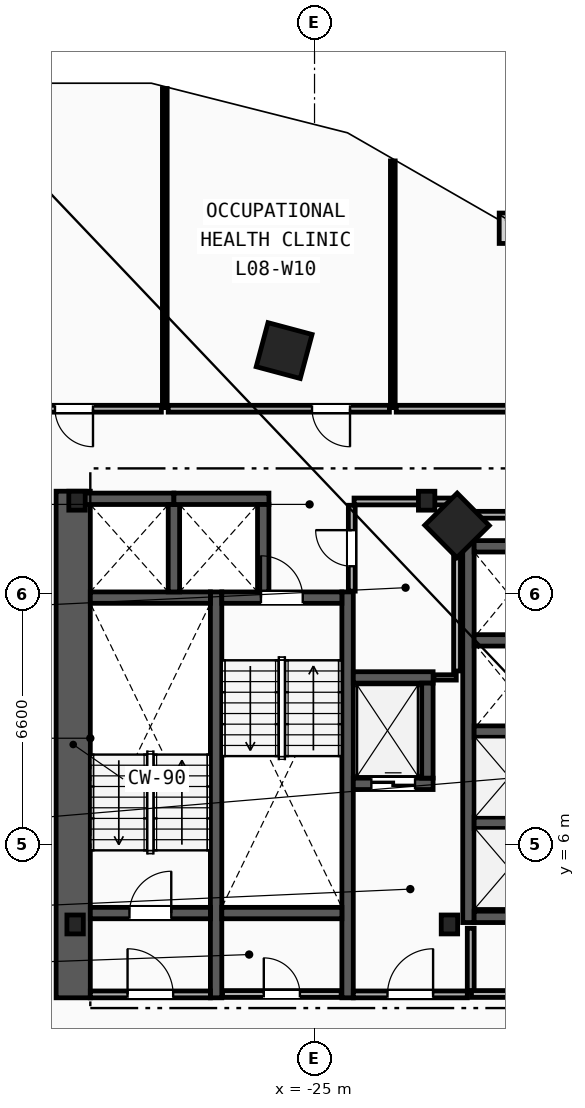
"""IFC4 building model, lengths in metres.
Left out: names, types, materials, properties, quantities, classifications, styles, units other than length and angle.
Written with IfcOpenShell. Run it as: python <this file> out.ifc"""

import sys

from ifc_helpers import new_model, si_unit, direction, frame, frame_2d, origin, origin_2d, place, context, subcontext, project, spatial, rectangle, i_section, extrude, element, fill, save


model = new_model("IFC4")
c1 = context("Model", 3, precision=1e-05, world=origin(), true_north=direction((0.0, 1.0)))
c2 = subcontext(c1, "Body", "Model", "MODEL_VIEW")
j1 = project(units=[si_unit("LENGTHUNIT", "METRE"), si_unit("PLANEANGLEUNIT", "RADIAN")], contexts=[c1])
p1 = place(None, origin())
s1 = spatial("IfcSite", under=j1, at=p1, CompositionType="ELEMENT")
p2 = place(p1, origin())
s2 = spatial("IfcBuilding", under=s1, at=p2, CompositionType="ELEMENT")
p3 = place(p2, frame((0.0, 0.0, 35.4)))
s3 = spatial("IfcBuildingStorey", under=s2, at=p3, CompositionType="ELEMENT", Elevation=35.4)
for number, where, z_axis, x_axis in (
    (1, (-31.3, 3.9, 0.0), (0.0, 0.0, 1.0), (1.0, 0.0, 0.0)),
    (2, (-21.45, 3.9, 0.0), (0.0, 0.0, 1.0), (1.0, 0.0, 0.0)),
    (3, (-22.05, 15.05, 0.0), (0.0, 0.0, 1.0), (1.0, 0.0, 0.0)),
    (4, (-31.25, 15.05, 0.0), (0.0, 0.0, 1.0), (1.0, 0.0, 0.0)),
):
    element("IfcColumn", number, at=place(p3, frame(where, z_axis=z_axis, x_axis=x_axis)), inside=s3, PredefinedType="COLUMN", context=c2, shape_type="SweptSolid", body=[
        extrude(i_section(OverallWidth=0.432, OverallDepth=0.498, WebThickness=0.056, FlangeThickness=0.089, FilletRadius=0.018, at=origin_2d()), origin(), (0.0, 0.0, 1.0), 3.8),
    ])
for number, where, z_axis, x_axis in (
    (5, (-21.25, 14.4, 0.0), (0.0, 0.0, 1.0), (-0.703, 0.711, 0.0)),
    (6, (-25.8, 19.0, 0.0), (0.0, 0.0, 1.0), (-0.966, 0.259, 0.0)),
):
    element("IfcColumn", number, at=place(p3, frame(where, z_axis=z_axis, x_axis=x_axis)), inside=s3, PredefinedType="COLUMN", context=c2, shape_type="SweptSolid", body=[
        extrude(rectangle(XDim=1.2, YDim=1.2, at=origin_2d()), origin(), (0.0, 0.0, 1.0), 3.8),
    ])
p4 = place(p3, frame((-31.35, 1.97, 0.0), z_axis=(0.0, 0.0, 1.0), x_axis=(0.0, 1.0, 0.0)))
e7 = element("IfcWall", 7, at=p4, inside=s3, PredefinedType="SHEAR", context=c2, shape_type="SweptSolid", body=[
    extrude(rectangle(XDim=13.33, YDim=0.9, at=frame_2d((6.665, 0.0))), origin(), (0.0, 0.0, 1.0), 3.5),
])
for number, where, z_axis, x_axis in (
    (8, (-27.59, 1.97, 0.0), (0.0, 0.0, 1.0), (0.0, 1.0, 0.0)),
    (9, (-24.13, 1.97, 0.0), (0.0, 0.0, 1.0), (0.0, 1.0, 0.0)),
):
    element("IfcWall", number, at=place(p3, frame(where, z_axis=z_axis, x_axis=x_axis)), inside=s3, PredefinedType="SHEAR", context=c2, shape_type="SweptSolid", body=[
        extrude(rectangle(XDim=10.68, YDim=0.3, at=frame_2d((5.34, 0.0))), origin(), (0.0, 0.0, 1.0), 3.5),
    ])
p5 = place(p3, frame((-30.9, 4.2, 0.0), z_axis=(0.0, 0.0, 1.0), x_axis=(1.0, 0.0, 0.0)))
e10 = element("IfcWall", 10, at=p5, inside=s3, PredefinedType="SHEAR", context=c2, shape_type="SweptSolid", body=[
    extrude(rectangle(XDim=3.16, YDim=0.3, at=frame_2d((1.58, 0.0))), origin(), (0.0, 0.0, 1.0), 3.5),
])
p6 = place(p5, frame((1.03, 0.0, 0.0)))
e11 = element("IfcOpeningElement", 11, at=p6, cuts=e10, PredefinedType="OPENING", context=c2, shape_type="SweptSolid", body=[
    extrude(rectangle(XDim=1.1, YDim=2.15, at=frame_2d((0.55, 1.075))), frame((0.0, 0.16, 0.0), z_axis=(0.0, -1.0, 0.0), x_axis=(1.0, 0.0, 0.0)), (0.0, 0.0, 1.0), 0.32),
])
p7 = place(p3, frame((-30.9, 12.5, 0.0), z_axis=(0.0, 0.0, 1.0), x_axis=(1.0, 0.0, 0.0)))
e12 = element("IfcWall", 12, at=p7, inside=s3, PredefinedType="SHEAR", context=c2, shape_type="SweptSolid", body=[
    extrude(rectangle(XDim=3.16, YDim=0.3, at=frame_2d((1.58, 0.0))), origin(), (0.0, 0.0, 1.0), 3.5),
])
p8 = place(p3, frame((-27.44, 12.5, 0.0), z_axis=(0.0, 0.0, 1.0), x_axis=(1.0, 0.0, 0.0)))
e13 = element("IfcWall", 13, at=p8, inside=s3, PredefinedType="SHEAR", context=c2, shape_type="SweptSolid", body=[
    extrude(rectangle(XDim=3.16, YDim=0.3, at=frame_2d((1.58, 0.0))), origin(), (0.0, 0.0, 1.0), 3.5),
])
p9 = place(p8, frame((1.03, 0.0, 0.0)))
e14 = element("IfcOpeningElement", 14, at=p9, cuts=e13, PredefinedType="OPENING", context=c2, shape_type="SweptSolid", body=[
    extrude(rectangle(XDim=1.1, YDim=2.15, at=frame_2d((0.55, 1.075))), frame((0.0, 0.16, 0.0), z_axis=(0.0, -1.0, 0.0), x_axis=(1.0, 0.0, 0.0)), (0.0, 0.0, 1.0), 0.32),
])
p10 = place(p3, frame((-27.44, 4.2, 0.0), z_axis=(0.0, 0.0, 1.0), x_axis=(1.0, 0.0, 0.0)))
e15 = element("IfcWall", 15, at=p10, inside=s3, PredefinedType="SHEAR", context=c2, shape_type="SweptSolid", body=[
    extrude(rectangle(XDim=3.16, YDim=0.3, at=frame_2d((1.58, 0.0))), origin(), (0.0, 0.0, 1.0), 3.5),
])
p11 = place(p3, frame((-20.89, 2.15, 0.0), z_axis=(0.0, 0.0, 1.0), x_axis=(0.0, 1.0, 0.0)))
e16 = element("IfcWall", 16, at=p11, inside=s3, PredefinedType="PARTITIONING", context=c2, shape_type="SweptSolid", body=[
    extrude(rectangle(XDim=1.65, YDim=0.18, at=frame_2d((0.825, 0.0))), origin(), (0.0, 0.0, 1.0), 3.5),
])
p12 = place(p3, frame((-23.98, 2.06, 0.0), z_axis=(0.0, 0.0, 1.0), x_axis=(1.0, 0.0, 0.0)))
e17 = element("IfcWall", 17, at=p12, inside=s3, PredefinedType="PARTITIONING", context=c2, shape_type="SweptSolid", body=[
    extrude(rectangle(XDim=3.0, YDim=0.18, at=frame_2d((1.5, 0.0))), origin(), (0.0, 0.0, 1.0), 3.5),
])
p13 = place(p12, frame((0.9, 0.0, 0.0)))
e18 = element("IfcOpeningElement", 18, at=p13, cuts=e17, PredefinedType="OPENING", context=c2, shape_type="SweptSolid", body=[
    extrude(rectangle(XDim=1.2, YDim=2.15, at=frame_2d((0.6, 1.075))), frame((0.0, 0.1, 0.0), z_axis=(0.0, -1.0, 0.0), x_axis=(1.0, 0.0, 0.0)), (0.0, 0.0, 1.0), 0.2),
])
p14 = place(p3, frame((-30.9, 2.06, 0.0), z_axis=(0.0, 0.0, 1.0), x_axis=(1.0, 0.0, 0.0)))
e19 = element("IfcWall", 19, at=p14, inside=s3, PredefinedType="PARTITIONING", context=c2, shape_type="SweptSolid", body=[
    extrude(rectangle(XDim=3.16, YDim=0.18, at=frame_2d((1.58, 0.0))), origin(), (0.0, 0.0, 1.0), 3.5),
])
p15 = place(p14, frame((0.98, 0.0, 0.0)))
e20 = element("IfcOpeningElement", 20, at=p15, cuts=e19, PredefinedType="OPENING", context=c2, shape_type="SweptSolid", body=[
    extrude(rectangle(XDim=1.2, YDim=2.15, at=frame_2d((0.6, 1.075))), frame((0.0, 0.1, 0.0), z_axis=(0.0, -1.0, 0.0), x_axis=(1.0, 0.0, 0.0)), (0.0, 0.0, 1.0), 0.2),
])
p16 = place(p3, frame((-23.98, 7.6, 0.0), z_axis=(0.0, 0.0, 1.0), x_axis=(1.0, 0.0, 0.0)))
e21 = element("IfcWall", 21, at=p16, inside=s3, PredefinedType="SHEAR", context=c2, shape_type="SweptSolid", body=[
    extrude(rectangle(XDim=2.1, YDim=0.3, at=frame_2d((1.05, 0.0))), origin(), (0.0, 0.0, 1.0), 3.5),
])
p17 = place(p16, frame((0.475, 0.0, 0.0)))
e22 = element("IfcOpeningElement", 22, at=p17, cuts=e21, PredefinedType="OPENING", context=c2, shape_type="SweptSolid", body=[
    extrude(rectangle(XDim=1.15, YDim=2.2, at=frame_2d((0.575, 1.1))), frame((0.0, 0.16, 0.0), z_axis=(0.0, -1.0, 0.0), x_axis=(1.0, 0.0, 0.0)), (0.0, 0.0, 1.0), 0.32),
])
p18 = place(p3, frame((-23.98, 10.4, 0.0), z_axis=(0.0, 0.0, 1.0), x_axis=(1.0, 0.0, 0.0)))
e23 = element("IfcWall", 23, at=p18, inside=s3, PredefinedType="SHEAR", context=c2, shape_type="SweptSolid", body=[
    extrude(rectangle(XDim=2.1, YDim=0.3, at=frame_2d((1.05, 0.0))), origin(), (0.0, 0.0, 1.0), 3.5),
])
for number, where, z_axis, x_axis in (
    (24, (-22.03, 7.75, 0.0), (0.0, 0.0, 1.0), (0.0, 1.0, 0.0)),
    (25, (-31.2, 15.1, 0.0), (0.0, 0.0, 1.0), (1.0, 0.0, 0.0)),
):
    element("IfcWall", number, at=place(p3, frame(where, z_axis=z_axis, x_axis=x_axis)), inside=s3, PredefinedType="SHEAR", context=c2, shape_type="SweptSolid", body=[
        extrude(rectangle(XDim=2.5, YDim=0.3, at=frame_2d((1.25, 0.0))), origin(), (0.0, 0.0, 1.0), 3.5),
    ])
p19 = place(p3, frame((-28.7, 12.65, 0.0), z_axis=(0.0, 0.0, 1.0), x_axis=(0.0, 1.0, 0.0)))
e26 = element("IfcWall", 26, at=p19, inside=s3, PredefinedType="SHEAR", context=c2, shape_type="SweptSolid", body=[
    extrude(rectangle(XDim=2.3, YDim=0.3, at=frame_2d((1.15, 0.0))), origin(), (0.0, 0.0, 1.0), 3.5),
])
p20 = place(p3, frame((-28.7, 15.1, 0.0), z_axis=(0.0, 0.0, 1.0), x_axis=(1.0, 0.0, 0.0)))
e27 = element("IfcWall", 27, at=p20, inside=s3, PredefinedType="SHEAR", context=c2, shape_type="SweptSolid", body=[
    extrude(rectangle(XDim=2.5, YDim=0.3, at=frame_2d((1.25, 0.0))), origin(), (0.0, 0.0, 1.0), 3.5),
])
p21 = place(p3, frame((-26.35, 12.65, 0.0), z_axis=(0.0, 0.0, 1.0), x_axis=(0.0, 1.0, 0.0)))
e28 = element("IfcWall", 28, at=p21, inside=s3, PredefinedType="SHEAR", context=c2, shape_type="SweptSolid", body=[
    extrude(rectangle(XDim=2.3, YDim=0.3, at=frame_2d((1.15, 0.0))), origin(), (0.0, 0.0, 1.0), 3.5),
])
p22 = place(p3, frame((-20.95, 3.95, 0.0), z_axis=(0.0, 0.0, 1.0), x_axis=(0.0, 1.0, 0.0)))
e29 = element("IfcWall", 29, at=p22, inside=s3, PredefinedType="SHEAR", context=c2, shape_type="SweptSolid", body=[
    extrude(rectangle(XDim=10.05, YDim=0.3, at=frame_2d((5.025, 0.0))), origin(), (0.0, 0.0, 1.0), 3.5),
])
for number, where, z_axis, x_axis in (
    (30, (-20.8, 4.1, 0.0), (0.0, 0.0, 1.0), (1.0, 0.0, 0.0)),
    (31, (-20.8, 13.85, 0.0), (0.0, 0.0, 1.0), (1.0, 0.0, 0.0)),
):
    element("IfcWall", number, at=place(p3, frame(where, z_axis=z_axis, x_axis=x_axis)), inside=s3, PredefinedType="SHEAR", context=c2, shape_type="SweptSolid", body=[
        extrude(rectangle(XDim=2.15, YDim=0.3, at=frame_2d((1.075, 0.0))), origin(), (0.0, 0.0, 1.0), 3.5),
    ])
for number, where, z_axis, x_axis in (
    (32, (-20.8, 6.575, 0.0), (0.0, 0.0, 1.0), (1.0, 0.0, 0.0)),
    (33, (-20.8, 8.975, 0.0), (0.0, 0.0, 1.0), (1.0, 0.0, 0.0)),
    (34, (-20.8, 11.375, 0.0), (0.0, 0.0, 1.0), (1.0, 0.0, 0.0)),
):
    element("IfcWall", number, at=place(p3, frame(where, z_axis=z_axis, x_axis=x_axis)), inside=s3, PredefinedType="SHEAR", context=c2, shape_type="SweptSolid", body=[
        extrude(rectangle(XDim=1.85, YDim=0.3, at=frame_2d((0.925, 0.0))), origin(), (0.0, 0.0, 1.0), 3.5),
    ])
p23 = place(p3, frame((-20.87, 2.07, 0.0), z_axis=(0.0, 0.0, 1.0), x_axis=(1.0, 0.0, 0.0)))
e35 = element("IfcWall", 35, at=p23, inside=s3, PredefinedType="PARTITIONING", context=c2, shape_type="SweptSolid", body=[
    extrude(rectangle(XDim=3.83, YDim=0.18, at=frame_2d((1.915, 0.0))), origin(), (0.0, 0.0, 1.0), 3.5),
])
p24 = place(p23, frame((1.44, 0.0, 0.0)))
e36 = element("IfcOpeningElement", 36, at=p24, cuts=e35, PredefinedType="OPENING", context=c2, shape_type="SweptSolid", body=[
    extrude(rectangle(XDim=0.95, YDim=2.1, at=frame_2d((0.475, 1.05))), frame((0.0, 0.1, 0.0), z_axis=(0.0, -1.0, 0.0), x_axis=(1.0, 0.0, 0.0)), (0.0, 0.0, 1.0), 0.2),
])
p25 = place(p3, frame((-21.86, 10.4, 0.0), z_axis=(0.0, 0.0, 1.0), x_axis=(1.0, 0.0, 0.0)))
e37 = element("IfcWall", 37, at=p25, inside=s3, PredefinedType="PARTITIONING", context=c2, shape_type="SweptSolid", body=[
    extrude(rectangle(XDim=0.59, YDim=0.14, at=frame_2d((0.295, 0.0))), origin(), (0.0, 0.0, 1.0), 3.5),
])
p26 = place(p3, frame((-21.25, 10.57, 0.0), z_axis=(0.0, 0.0, 1.0), x_axis=(0.0, 1.0, 0.0)))
e38 = element("IfcWall", 38, at=p26, inside=s3, PredefinedType="PARTITIONING", context=c2, shape_type="SweptSolid", body=[
    extrude(rectangle(XDim=4.36, YDim=0.18, at=frame_2d((2.18, 0.0))), origin(), (0.0, 0.0, 1.0), 3.5),
])
p27 = place(p3, frame((-23.96, 15.03, 0.0), z_axis=(0.0, 0.0, 1.0), x_axis=(1.0, 0.0, 0.0)))
e39 = element("IfcWall", 39, at=p27, inside=s3, PredefinedType="PARTITIONING", context=c2, shape_type="SweptSolid", body=[
    extrude(rectangle(XDim=2.61, YDim=0.18, at=frame_2d((1.305, 0.0))), origin(), (0.0, 0.0, 1.0), 2.573),
])
p28 = place(p3, frame((-27.42, 2.07, 0.0), z_axis=(0.0, 0.0, 1.0), x_axis=(1.0, 0.0, 0.0)))
e40 = element("IfcWall", 40, at=p28, inside=s3, PredefinedType="PARTITIONING", context=c2, shape_type="SweptSolid", body=[
    extrude(rectangle(XDim=3.12, YDim=0.18, at=frame_2d((1.56, 0.0))), origin(), (0.0, 0.0, 1.0), 3.5),
])
p29 = place(p28, frame((1.085, 0.0, 0.0)))
e41 = element("IfcOpeningElement", 41, at=p29, cuts=e40, PredefinedType="OPENING", context=c2, shape_type="SweptSolid", body=[
    extrude(rectangle(XDim=0.95, YDim=2.1, at=frame_2d((0.475, 1.05))), frame((0.0, 0.1, 0.0), z_axis=(0.0, -1.0, 0.0), x_axis=(1.0, 0.0, 0.0)), (0.0, 0.0, 1.0), 0.2),
])
p30 = place(p3, frame((-24.02, 12.67, 0.0), z_axis=(0.0, 0.0, 1.0), x_axis=(0.0, 1.0, 0.0)))
e42 = element("IfcWall", 42, at=p30, inside=s3, PredefinedType="PARTITIONING", context=c2, shape_type="SweptSolid", body=[
    extrude(rectangle(XDim=2.26, YDim=0.18, at=frame_2d((1.13, 0.0))), origin(), (0.0, 0.0, 1.0), 3.5),
])
p31 = place(p30, frame((0.655, 0.0, 0.0)))
e43 = element("IfcOpeningElement", 43, at=p31, cuts=e42, PredefinedType="OPENING", context=c2, shape_type="SweptSolid", body=[
    extrude(rectangle(XDim=0.95, YDim=2.1, at=frame_2d((0.475, 1.05))), frame((0.0, 0.1, 0.0), z_axis=(0.0, -1.0, 0.0), x_axis=(1.0, 0.0, 0.0)), (0.0, 0.0, 1.0), 0.2),
])
p32 = place(p3, frame((-28.94, 17.5, 0.0), z_axis=(0.0, 0.0, 1.0), x_axis=(0.0, 1.0, 0.0)))
e44 = element("IfcWall", 44, at=p32, inside=s3, PredefinedType="PARTITIONING", context=c2, shape_type="SweptSolid", body=[
    extrude(rectangle(XDim=8.395, YDim=0.125, at=frame_2d((4.197, 0.0))), origin(), (0.0, 0.0, 1.0), 3.5),
])
p33 = place(p3, frame((-22.94, 17.5, 0.0), z_axis=(0.0, 0.0, 1.0), x_axis=(0.0, 1.0, 0.0)))
e45 = element("IfcWall", 45, at=p33, inside=s3, PredefinedType="PARTITIONING", context=c2, shape_type="SweptSolid", body=[
    extrude(rectangle(XDim=6.49, YDim=0.125, at=frame_2d((3.245, 0.0))), origin(), (0.0, 0.0, 1.0), 3.5),
])
p34 = place(p3, frame((-16.822, 17.47, 0.0), z_axis=(0.0, 0.0, 1.0), x_axis=(-1.0, 0.0, 0.0)))
e46 = element("IfcWall", 46, at=p34, inside=s3, PredefinedType="PARTITIONING", context=c2, shape_type="SweptSolid", body=[
    extrude(rectangle(XDim=6.029, YDim=0.18, at=frame_2d((3.014, 0.0))), origin(), (0.0, 0.0, 1.0), 3.5),
])
p35 = place(p3, frame((-21.178, 14.68, 0.0), z_axis=(0.0, 0.0, 1.0), x_axis=(1.0, 0.0, 0.0)))
e47 = element("IfcWall", 47, at=p35, inside=s3, PredefinedType="PARTITIONING", context=c2, shape_type="SweptSolid", body=[
    extrude(rectangle(XDim=4.357, YDim=0.18, at=frame_2d((2.178, 0.0))), origin(), (0.0, 0.0, 1.0), 3.5),
])
p36 = place(p3, frame((-29.03, 17.47, 0.0), z_axis=(0.0, 0.0, 1.0), x_axis=(-1.0, 0.0, 0.0)))
e48 = element("IfcWall", 48, at=p36, inside=s3, PredefinedType="PARTITIONING", context=c2, shape_type="SweptSolid", body=[
    extrude(rectangle(XDim=4.598, YDim=0.18, at=frame_2d((2.299, 0.0))), origin(), (0.0, 0.0, 1.0), 3.5),
])
p37 = place(p36, frame((1.799, 0.0, 0.0)))
e49 = element("IfcOpeningElement", 49, at=p37, cuts=e48, PredefinedType="OPENING", context=c2, shape_type="SweptSolid", body=[
    extrude(rectangle(XDim=1.0, YDim=2.15, at=frame_2d((0.5, 1.075))), frame((0.0, 0.1, 0.0), z_axis=(0.0, -1.0, 0.0), x_axis=(1.0, 0.0, 0.0)), (0.0, 0.0, 1.0), 0.2),
])
p38 = place(p3, frame((-23.03, 17.47, 0.0), z_axis=(0.0, 0.0, 1.0), x_axis=(-1.0, 0.0, 0.0)))
e50 = element("IfcWall", 50, at=p38, inside=s3, PredefinedType="PARTITIONING", context=c2, shape_type="SweptSolid", body=[
    extrude(rectangle(XDim=5.82, YDim=0.18, at=frame_2d((2.91, 0.0))), origin(), (0.0, 0.0, 1.0), 3.5),
])
p39 = place(p38, frame((1.036, 0.0, 0.0)))
e51 = element("IfcOpeningElement", 51, at=p39, cuts=e50, PredefinedType="OPENING", context=c2, shape_type="SweptSolid", body=[
    extrude(rectangle(XDim=1.0, YDim=2.15, at=frame_2d((0.5, 1.075))), frame((0.0, 0.1, 0.0), z_axis=(0.0, -1.0, 0.0), x_axis=(1.0, 0.0, 0.0)), (0.0, 0.0, 1.0), 0.2),
])
p40 = place(p6, origin())
e52 = element("IfcDoor", 52, at=p40, inside=s3, OperationType="SINGLE_SWING_RIGHT", PredefinedType="DOOR", context=c2, shape_type="SweptSolid", body=[
    extrude(rectangle(XDim=1.1, YDim=2.15, at=frame_2d((0.55, 1.075))), frame((0.0, 0.025, 0.0), z_axis=(0.0, -1.0, 0.0), x_axis=(1.0, 0.0, 0.0)), (0.0, 0.0, 1.0), 0.05),
])
fill(e11, e52)
p41 = place(p9, origin())
e53 = element("IfcDoor", 53, at=p41, inside=s3, OperationType="SINGLE_SWING_LEFT", PredefinedType="DOOR", context=c2, shape_type="SweptSolid", body=[
    extrude(rectangle(XDim=1.1, YDim=2.15, at=frame_2d((0.55, 1.075))), frame((0.0, 0.025, 0.0), z_axis=(0.0, -1.0, 0.0), x_axis=(1.0, 0.0, 0.0)), (0.0, 0.0, 1.0), 0.05),
])
fill(e14, e53)
p42 = place(p13, origin())
e54 = element("IfcDoor", 54, at=p42, inside=s3, OperationType="SINGLE_SWING_RIGHT", PredefinedType="DOOR", context=c2, shape_type="SweptSolid", body=[
    extrude(rectangle(XDim=1.2, YDim=2.15, at=frame_2d((0.6, 1.075))), frame((0.0, 0.025, 0.0), z_axis=(0.0, -1.0, 0.0), x_axis=(1.0, 0.0, 0.0)), (0.0, 0.0, 1.0), 0.05),
])
fill(e18, e54)
p43 = place(p15, origin())
e55 = element("IfcDoor", 55, at=p43, inside=s3, OperationType="SINGLE_SWING_LEFT", PredefinedType="DOOR", context=c2, shape_type="SweptSolid", body=[
    extrude(rectangle(XDim=1.2, YDim=2.15, at=frame_2d((0.6, 1.075))), frame((0.0, 0.025, 0.0), z_axis=(0.0, -1.0, 0.0), x_axis=(1.0, 0.0, 0.0)), (0.0, 0.0, 1.0), 0.05),
])
fill(e20, e55)
p44 = place(p17, origin())
e56 = element("IfcDoor", 56, at=p44, inside=s3, OperationType="SLIDING_TO_LEFT", PredefinedType="TRAPDOOR", context=c2, shape_type="SweptSolid", body=[
    extrude(rectangle(XDim=1.15, YDim=2.2, at=frame_2d((0.575, 1.1))), frame((0.0, 0.025, 0.0), z_axis=(0.0, -1.0, 0.0), x_axis=(1.0, 0.0, 0.0)), (0.0, 0.0, 1.0), 0.05),
])
fill(e22, e56)
p45 = place(p39, origin())
e57 = element("IfcDoor", 57, at=p45, inside=s3, OperationType="SINGLE_SWING_LEFT", PredefinedType="DOOR", context=c2, shape_type="SweptSolid", body=[
    extrude(rectangle(XDim=1.0, YDim=2.15, at=frame_2d((0.5, 1.075))), frame((0.0, 0.025, 0.0), z_axis=(0.0, -1.0, 0.0), x_axis=(1.0, 0.0, 0.0)), (0.0, 0.0, 1.0), 0.05),
])
fill(e51, e57)
p46 = place(p37, origin())
e58 = element("IfcDoor", 58, at=p46, inside=s3, OperationType="SINGLE_SWING_LEFT", PredefinedType="DOOR", context=c2, shape_type="SweptSolid", body=[
    extrude(rectangle(XDim=1.0, YDim=2.15, at=frame_2d((0.5, 1.075))), frame((0.0, 0.025, 0.0), z_axis=(0.0, -1.0, 0.0), x_axis=(1.0, 0.0, 0.0)), (0.0, 0.0, 1.0), 0.05),
])
fill(e49, e58)
p47 = place(p29, origin())
e59 = element("IfcDoor", 59, at=p47, inside=s3, OperationType="SINGLE_SWING_LEFT", PredefinedType="DOOR", context=c2, shape_type="SweptSolid", body=[
    extrude(rectangle(XDim=0.95, YDim=2.1, at=frame_2d((0.475, 1.05))), frame((0.0, 0.025, 0.0), z_axis=(0.0, -1.0, 0.0), x_axis=(1.0, 0.0, 0.0)), (0.0, 0.0, 1.0), 0.05),
])
fill(e41, e59)
p48 = place(p31, origin())
e60 = element("IfcDoor", 60, at=p48, inside=s3, OperationType="SINGLE_SWING_RIGHT", PredefinedType="DOOR", context=c2, shape_type="SweptSolid", body=[
    extrude(rectangle(XDim=0.95, YDim=2.1, at=frame_2d((0.475, 1.05))), frame((0.0, 0.025, 0.0), z_axis=(0.0, -1.0, 0.0), x_axis=(1.0, 0.0, 0.0)), (0.0, 0.0, 1.0), 0.05),
])
fill(e43, e60)
save(model, sys.argv[1])
